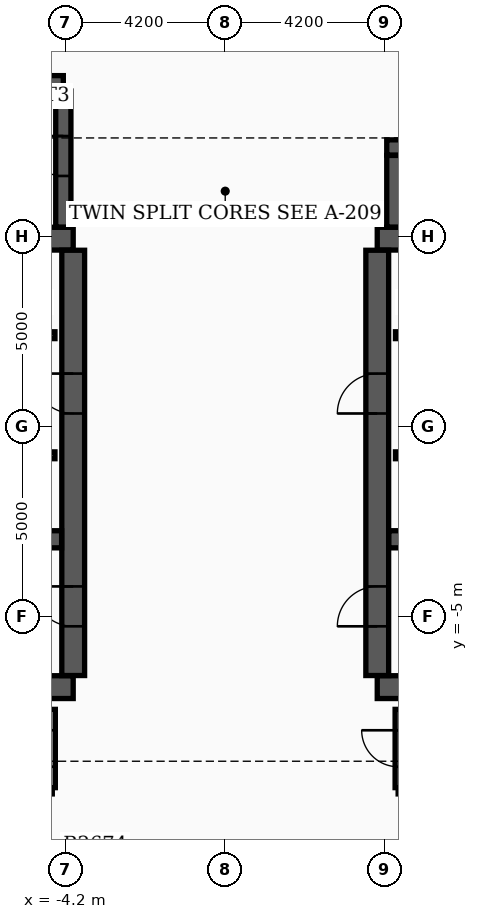
"""IFC4 building model, lengths in metres.
Left out: names, types, materials, properties, quantities, classifications, styles, units other than length and angle.
Written with IfcOpenShell. Run it as: python <this file> out.ifc"""

import sys

from ifc_helpers import new_model, si_unit, direction, frame, frame_2d, origin, place, context, subcontext, project, spatial, rectangle, extrude, element, fill, save


model = new_model("IFC4")
c1 = context("Model", 3, precision=1e-05, world=origin(), true_north=direction((0.0, 1.0)))
c2 = subcontext(c1, "Body", "Model", "MODEL_VIEW")
j1 = project(units=[si_unit("LENGTHUNIT", "METRE"), si_unit("PLANEANGLEUNIT", "RADIAN")], contexts=[c1])
p1 = place(None, origin())
s1 = spatial("IfcSite", under=j1, at=p1, CompositionType="ELEMENT")
p2 = place(p1, origin())
s2 = spatial("IfcBuilding", under=s1, at=p2, CompositionType="ELEMENT")
p3 = place(p2, frame((0.0, 0.0, 168.3)))
s3 = spatial("IfcBuildingStorey", under=s2, at=p3, CompositionType="ELEMENT", Elevation=168.3)
for number, where, z_axis, x_axis in (
    (1, (-12.4, -6.85, 0.0), (0.0, 0.0, 1.0), (1.0, 0.0, 0.0)),
    (2, (-12.4, 4.95, 0.0), (0.0, 0.0, 1.0), (1.0, 0.0, 0.0)),
):
    element("IfcWall", number, at=place(p3, frame(where, z_axis=z_axis, x_axis=x_axis)), inside=s3, PredefinedType="SHEAR", context=c2, shape_type="SweptSolid", body=[
        extrude(rectangle(XDim=8.4, YDim=0.6, at=frame_2d((4.2, 0.0))), origin(), (0.0, 0.0, 1.0), 3.7),
    ])
p4 = place(p3, frame((-4.0, -6.545, 0.0), z_axis=(0.0, 0.0, 1.0), x_axis=(0.0, 1.0, 0.0)))
e3 = element("IfcWall", 3, at=p4, inside=s3, PredefinedType="SHEAR", context=c2, shape_type="SweptSolid", body=[
    extrude(rectangle(XDim=11.19, YDim=0.6, at=frame_2d((5.595, 0.0))), origin(), (0.0, 0.0, 1.0), 3.7),
])
p5 = place(p4, frame((1.295, 0.0, 0.0)))
e4 = element("IfcOpeningElement", 4, at=p5, cuts=e3, PredefinedType="OPENING", context=c2, shape_type="SweptSolid", body=[
    extrude(rectangle(XDim=1.05, YDim=2.15, at=frame_2d((0.525, 1.075))), frame((0.0, 0.31, 0.0), z_axis=(0.0, -1.0, 0.0), x_axis=(1.0, 0.0, 0.0)), (0.0, 0.0, 1.0), 0.62),
])
p6 = place(p4, frame((6.895, 0.0, 0.0)))
e5 = element("IfcOpeningElement", 5, at=p6, cuts=e3, PredefinedType="OPENING", context=c2, shape_type="SweptSolid", body=[
    extrude(rectangle(XDim=1.05, YDim=2.15, at=frame_2d((0.525, 1.075))), frame((0.0, 0.31, 0.0), z_axis=(0.0, -1.0, 0.0), x_axis=(1.0, 0.0, 0.0)), (0.0, 0.0, 1.0), 0.62),
])
p7 = place(p3, frame((-12.095, -2.96, 0.0), z_axis=(0.0, 0.0, 1.0), x_axis=(1.0, 0.0, 0.0)))
e6 = element("IfcWall", 6, at=p7, inside=s3, PredefinedType="SHEAR", context=c2, shape_type="SweptSolid", body=[
    extrude(rectangle(XDim=7.79, YDim=0.45, at=frame_2d((3.895, 0.0))), origin(), (0.0, 0.0, 1.0), 3.7),
])
for number, where, z_axis, x_axis in (
    (7, (4.0, -6.85, 0.0), (0.0, 0.0, 1.0), (1.0, 0.0, 0.0)),
    (8, (4.0, 4.95, 0.0), (0.0, 0.0, 1.0), (1.0, 0.0, 0.0)),
):
    element("IfcWall", number, at=place(p3, frame(where, z_axis=z_axis, x_axis=x_axis)), inside=s3, PredefinedType="SHEAR", context=c2, shape_type="SweptSolid", body=[
        extrude(rectangle(XDim=8.4, YDim=0.6, at=frame_2d((4.2, 0.0))), origin(), (0.0, 0.0, 1.0), 3.7),
    ])
p8 = place(p3, frame((4.0, -6.545, 0.0), z_axis=(0.0, 0.0, 1.0), x_axis=(0.0, 1.0, 0.0)))
e9 = element("IfcWall", 9, at=p8, inside=s3, PredefinedType="SHEAR", context=c2, shape_type="SweptSolid", body=[
    extrude(rectangle(XDim=11.19, YDim=0.6, at=frame_2d((5.595, 0.0))), origin(), (0.0, 0.0, 1.0), 3.7),
])
p9 = place(p8, frame((1.295, 0.0, 0.0)))
e10 = element("IfcOpeningElement", 10, at=p9, cuts=e9, PredefinedType="OPENING", context=c2, shape_type="SweptSolid", body=[
    extrude(rectangle(XDim=1.05, YDim=2.15, at=frame_2d((0.525, 1.075))), frame((0.0, 0.31, 0.0), z_axis=(0.0, -1.0, 0.0), x_axis=(1.0, 0.0, 0.0)), (0.0, 0.0, 1.0), 0.62),
])
p10 = place(p8, frame((6.895, 0.0, 0.0)))
e11 = element("IfcOpeningElement", 11, at=p10, cuts=e9, PredefinedType="OPENING", context=c2, shape_type="SweptSolid", body=[
    extrude(rectangle(XDim=1.05, YDim=2.15, at=frame_2d((0.525, 1.075))), frame((0.0, 0.31, 0.0), z_axis=(0.0, -1.0, 0.0), x_axis=(1.0, 0.0, 0.0)), (0.0, 0.0, 1.0), 0.62),
])
p11 = place(p3, frame((4.305, -2.96, 0.0), z_axis=(0.0, 0.0, 1.0), x_axis=(1.0, 0.0, 0.0)))
e12 = element("IfcWall", 12, at=p11, inside=s3, PredefinedType="SHEAR", context=c2, shape_type="SweptSolid", body=[
    extrude(rectangle(XDim=7.79, YDim=0.45, at=frame_2d((3.895, 0.0))), origin(), (0.0, 0.0, 1.0), 3.7),
])
p12 = place(p3, frame((-12.22, 9.04, 0.0), z_axis=(0.0, 0.0, 1.0), x_axis=(1.0, 0.0, 0.0)))
e13 = element("IfcWall", 13, at=p12, inside=s3, PredefinedType="SHEAR", context=c2, shape_type="SweptSolid", body=[
    extrude(rectangle(XDim=7.96, YDim=0.4, at=frame_2d((3.98, 0.0))), origin(), (0.0, 0.0, 1.0), 3.7),
])
p13 = place(p3, frame((-4.26, 5.255, 0.0), z_axis=(0.0, 0.0, 1.0), x_axis=(0.0, 1.0, 0.0)))
e14 = element("IfcWall", 14, at=p13, inside=s3, PredefinedType="SHEAR", context=c2, shape_type="SweptSolid", body=[
    extrude(rectangle(XDim=3.58, YDim=0.4, at=frame_2d((1.79, 0.0))), origin(), (0.0, 0.0, 1.0), 3.7),
])
p14 = place(p13, frame((1.345, 0.0, 0.0)))
e15 = element("IfcOpeningElement", 15, at=p14, cuts=e14, PredefinedType="OPENING", context=c2, shape_type="SweptSolid", body=[
    extrude(rectangle(XDim=1.05, YDim=2.15, at=frame_2d((0.525, 1.075))), frame((0.0, 0.21, 0.0), z_axis=(0.0, -1.0, 0.0), x_axis=(1.0, 0.0, 0.0)), (0.0, 0.0, 1.0), 0.42),
])
p15 = place(p3, frame((4.45, 5.255, 0.0), z_axis=(0.0, 0.0, 1.0), x_axis=(0.0, 1.0, 0.0)))
e16 = element("IfcWall", 16, at=p15, inside=s3, PredefinedType="SHEAR", context=c2, shape_type="SweptSolid", body=[
    extrude(rectangle(XDim=1.885, YDim=0.4, at=frame_2d((0.942, 0.0))), origin(), (0.0, 0.0, 1.0), 3.7),
])
p16 = place(p3, frame((4.25, 7.35, 0.0), z_axis=(0.0, 0.0, 1.0), x_axis=(1.0, 0.0, 0.0)))
e17 = element("IfcWall", 17, at=p16, inside=s3, PredefinedType="SHEAR", context=c2, shape_type="SweptSolid", body=[
    extrude(rectangle(XDim=5.4, YDim=0.4, at=frame_2d((2.7, 0.0))), origin(), (0.0, 0.0, 1.0), 3.7),
])
p17 = place(p3, frame((-11.9, 2.41, 0.0), z_axis=(0.0, 0.0, 1.0), x_axis=(1.0, 0.0, 0.0)))
e18 = element("IfcWall", 18, at=p17, inside=s3, PredefinedType="SOLIDWALL", context=c2, shape_type="SweptSolid", body=[
    extrude(rectangle(XDim=7.42, YDim=0.18, at=frame_2d((3.71, 0.0))), origin(), (0.0, 0.0, 1.0), 2.96),
])
p18 = place(p17, frame((0.55, 0.0, 0.0)))
e19 = element("IfcOpeningElement", 19, at=p18, cuts=e18, PredefinedType="OPENING", context=c2, shape_type="SweptSolid", body=[
    extrude(rectangle(XDim=1.1, YDim=2.15, at=frame_2d((0.55, 1.075))), frame((0.0, 0.1, 0.0), z_axis=(0.0, -1.0, 0.0), x_axis=(1.0, 0.0, 0.0)), (0.0, 0.0, 1.0), 0.2),
])
p19 = place(p17, frame((4.9, 0.0, 0.0)))
e20 = element("IfcOpeningElement", 20, at=p19, cuts=e18, PredefinedType="OPENING", context=c2, shape_type="SweptSolid", body=[
    extrude(rectangle(XDim=0.88, YDim=2.1, at=frame_2d((0.44, 1.05))), frame((0.0, 0.1, 0.0), z_axis=(0.0, -1.0, 0.0), x_axis=(1.0, 0.0, 0.0)), (0.0, 0.0, 1.0), 0.2),
])
p20 = place(p3, frame((4.48, 2.41, 0.0), z_axis=(0.0, 0.0, 1.0), x_axis=(1.0, 0.0, 0.0)))
e21 = element("IfcWall", 21, at=p20, inside=s3, PredefinedType="SOLIDWALL", context=c2, shape_type="SweptSolid", body=[
    extrude(rectangle(XDim=7.42, YDim=0.18, at=frame_2d((3.71, 0.0))), origin(), (0.0, 0.0, 1.0), 2.96),
])
p21 = place(p20, frame((5.67, 0.0, 0.0)))
e22 = element("IfcOpeningElement", 22, at=p21, cuts=e21, PredefinedType="OPENING", context=c2, shape_type="SweptSolid", body=[
    extrude(rectangle(XDim=1.1, YDim=2.15, at=frame_2d((0.55, 1.075))), frame((0.0, 0.1, 0.0), z_axis=(0.0, -1.0, 0.0), x_axis=(1.0, 0.0, 0.0)), (0.0, 0.0, 1.0), 0.2),
])
p22 = place(p20, frame((1.6, 0.0, 0.0)))
e23 = element("IfcOpeningElement", 23, at=p22, cuts=e21, PredefinedType="OPENING", context=c2, shape_type="SweptSolid", body=[
    extrude(rectangle(XDim=0.88, YDim=2.1, at=frame_2d((0.44, 1.05))), frame((0.0, 0.1, 0.0), z_axis=(0.0, -1.0, 0.0), x_axis=(1.0, 0.0, 0.0)), (0.0, 0.0, 1.0), 0.2),
])
p23 = place(p3, frame((-11.9, -0.75, 0.0), z_axis=(0.0, 0.0, 1.0), x_axis=(1.0, 0.0, 0.0)))
e24 = element("IfcWall", 24, at=p23, inside=s3, PredefinedType="SOLIDWALL", context=c2, shape_type="SweptSolid", body=[
    extrude(rectangle(XDim=7.42, YDim=0.18, at=frame_2d((3.71, 0.0))), origin(), (0.0, 0.0, 1.0), 2.96),
])
p24 = place(p23, frame((0.45, 0.0, 0.0)))
e25 = element("IfcOpeningElement", 25, at=p24, cuts=e24, PredefinedType="OPENING", context=c2, shape_type="SweptSolid", body=[
    extrude(rectangle(XDim=1.1, YDim=2.15, at=frame_2d((0.55, 1.075))), frame((0.0, 0.1, 0.0), z_axis=(0.0, -1.0, 0.0), x_axis=(1.0, 0.0, 0.0)), (0.0, 0.0, 1.0), 0.2),
])
p25 = place(p23, frame((2.35, 0.0, 0.0)))
e26 = element("IfcOpeningElement", 26, at=p25, cuts=e24, PredefinedType="OPENING", context=c2, shape_type="SweptSolid", body=[
    extrude(rectangle(XDim=1.1, YDim=2.15, at=frame_2d((0.55, 1.075))), frame((0.0, 0.1, 0.0), z_axis=(0.0, -1.0, 0.0), x_axis=(1.0, 0.0, 0.0)), (0.0, 0.0, 1.0), 0.2),
])
p26 = place(p3, frame((4.48, -0.75, 0.0), z_axis=(0.0, 0.0, 1.0), x_axis=(1.0, 0.0, 0.0)))
e27 = element("IfcWall", 27, at=p26, inside=s3, PredefinedType="SOLIDWALL", context=c2, shape_type="SweptSolid", body=[
    extrude(rectangle(XDim=7.42, YDim=0.18, at=frame_2d((3.71, 0.0))), origin(), (0.0, 0.0, 1.0), 2.96),
])
p27 = place(p26, frame((0.52, 0.0, 0.0)))
e28 = element("IfcOpeningElement", 28, at=p27, cuts=e27, PredefinedType="OPENING", context=c2, shape_type="SweptSolid", body=[
    extrude(rectangle(XDim=1.1, YDim=2.15, at=frame_2d((0.55, 1.075))), frame((0.0, 0.1, 0.0), z_axis=(0.0, -1.0, 0.0), x_axis=(1.0, 0.0, 0.0)), (0.0, 0.0, 1.0), 0.2),
])
p28 = place(p3, frame((4.55, -9.58, 0.0), z_axis=(0.0, 0.0, 1.0), x_axis=(1.0, 0.0, 0.0)))
e29 = element("IfcWall", 29, at=p28, inside=s3, PredefinedType="PARTITIONING", context=c2, shape_type="SweptSolid", body=[
    extrude(rectangle(XDim=8.1, YDim=0.16, at=frame_2d((4.05, 0.0))), origin(), (0.0, 0.0, 1.0), 2.96),
])
p29 = place(p3, frame((4.55, -9.495, 0.0), z_axis=(0.0, 0.0, 1.0), x_axis=(0.0, 1.0, 0.0)))
e30 = element("IfcWall", 30, at=p29, inside=s3, PredefinedType="PARTITIONING", context=c2, shape_type="SweptSolid", body=[
    extrude(rectangle(XDim=2.06, YDim=0.16, at=frame_2d((1.03, 0.0))), origin(), (0.0, 0.0, 1.0), 2.96),
])
p30 = place(p29, frame((0.55, 0.0, 0.0)))
e31 = element("IfcOpeningElement", 31, at=p30, cuts=e30, PredefinedType="OPENING", context=c2, shape_type="SweptSolid", body=[
    extrude(rectangle(XDim=0.96, YDim=2.15, at=frame_2d((0.48, 1.075))), frame((0.0, 0.09, 0.0), z_axis=(0.0, -1.0, 0.0), x_axis=(1.0, 0.0, 0.0)), (0.0, 0.0, 1.0), 0.18),
])
p31 = place(p3, frame((-4.55, -9.495, 0.0), z_axis=(0.0, 0.0, 1.0), x_axis=(0.0, 1.0, 0.0)))
e32 = element("IfcWall", 32, at=p31, inside=s3, PredefinedType="PARTITIONING", context=c2, shape_type="SweptSolid", body=[
    extrude(rectangle(XDim=2.06, YDim=0.16, at=frame_2d((1.03, 0.0))), origin(), (0.0, 0.0, 1.0), 2.96),
])
p32 = place(p31, frame((0.55, 0.0, 0.0)))
e33 = element("IfcOpeningElement", 33, at=p32, cuts=e32, PredefinedType="OPENING", context=c2, shape_type="SweptSolid", body=[
    extrude(rectangle(XDim=0.96, YDim=2.15, at=frame_2d((0.48, 1.075))), frame((0.0, 0.09, 0.0), z_axis=(0.0, -1.0, 0.0), x_axis=(1.0, 0.0, 0.0)), (0.0, 0.0, 1.0), 0.18),
])
p33 = place(p5, origin())
e34 = element("IfcDoor", 34, at=p33, inside=s3, OperationType="SINGLE_SWING_RIGHT", PredefinedType="DOOR", context=c2, shape_type="SweptSolid", body=[
    extrude(rectangle(XDim=1.05, YDim=2.15, at=frame_2d((0.525, 1.075))), frame((0.0, 0.025, 0.0), z_axis=(0.0, -1.0, 0.0), x_axis=(1.0, 0.0, 0.0)), (0.0, 0.0, 1.0), 0.05),
])
fill(e4, e34)
p34 = place(p9, origin())
e35 = element("IfcDoor", 35, at=p34, inside=s3, OperationType="SINGLE_SWING_LEFT", PredefinedType="DOOR", context=c2, shape_type="SweptSolid", body=[
    extrude(rectangle(XDim=1.05, YDim=2.15, at=frame_2d((0.525, 1.075))), frame((0.0, 0.025, 0.0), z_axis=(0.0, -1.0, 0.0), x_axis=(1.0, 0.0, 0.0)), (0.0, 0.0, 1.0), 0.05),
])
fill(e10, e35)
p35 = place(p6, origin())
e36 = element("IfcDoor", 36, at=p35, inside=s3, OperationType="SINGLE_SWING_RIGHT", PredefinedType="DOOR", context=c2, shape_type="SweptSolid", body=[
    extrude(rectangle(XDim=1.05, YDim=2.15, at=frame_2d((0.525, 1.075))), frame((0.0, 0.025, 0.0), z_axis=(0.0, -1.0, 0.0), x_axis=(1.0, 0.0, 0.0)), (0.0, 0.0, 1.0), 0.05),
])
fill(e5, e36)
p36 = place(p10, origin())
e37 = element("IfcDoor", 37, at=p36, inside=s3, OperationType="SINGLE_SWING_LEFT", PredefinedType="DOOR", context=c2, shape_type="SweptSolid", body=[
    extrude(rectangle(XDim=1.05, YDim=2.15, at=frame_2d((0.525, 1.075))), frame((0.0, 0.025, 0.0), z_axis=(0.0, -1.0, 0.0), x_axis=(1.0, 0.0, 0.0)), (0.0, 0.0, 1.0), 0.05),
])
fill(e11, e37)
p37 = place(p14, origin())
e38 = element("IfcDoor", 38, at=p37, inside=s3, OperationType="SINGLE_SWING_RIGHT", PredefinedType="DOOR", context=c2, shape_type="SweptSolid", body=[
    extrude(rectangle(XDim=1.05, YDim=2.15, at=frame_2d((0.525, 1.075))), frame((0.0, 0.025, 0.0), z_axis=(0.0, -1.0, 0.0), x_axis=(1.0, 0.0, 0.0)), (0.0, 0.0, 1.0), 0.05),
])
fill(e15, e38)
p38 = place(p30, origin())
e39 = element("IfcDoor", 39, at=p38, inside=s3, OperationType="SINGLE_SWING_RIGHT", PredefinedType="DOOR", context=c2, shape_type="SweptSolid", body=[
    extrude(rectangle(XDim=0.96, YDim=2.15, at=frame_2d((0.48, 1.075))), frame((0.0, 0.025, 0.0), z_axis=(0.0, -1.0, 0.0), x_axis=(1.0, 0.0, 0.0)), (0.0, 0.0, 1.0), 0.05),
])
fill(e31, e39)
p39 = place(p32, origin())
e40 = element("IfcDoor", 40, at=p39, inside=s3, OperationType="SINGLE_SWING_LEFT", PredefinedType="DOOR", context=c2, shape_type="SweptSolid", body=[
    extrude(rectangle(XDim=0.96, YDim=2.15, at=frame_2d((0.48, 1.075))), frame((0.0, 0.025, 0.0), z_axis=(0.0, -1.0, 0.0), x_axis=(1.0, 0.0, 0.0)), (0.0, 0.0, 1.0), 0.05),
])
fill(e33, e40)
save(model, sys.argv[1])
